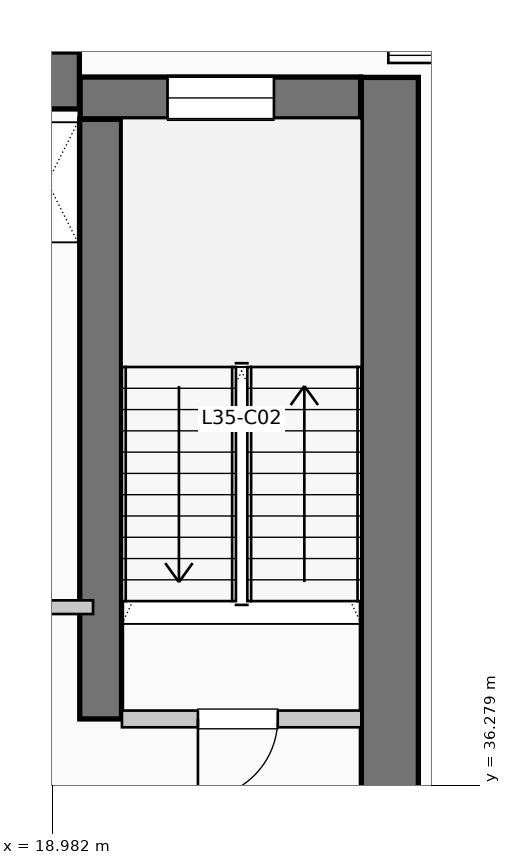
"""IFC4 building model, lengths in metres.
Left out: names, types, materials, properties, quantities, classifications, styles, units other than length and angle.
Written with IfcOpenShell. Run it as: python <this file> out.ifc"""

import sys

from ifc_helpers import new_model, si_unit, direction, frame, frame_2d, origin, place, context, subcontext, project, spatial, rectangle, extrude, element, fill, save


model = new_model("IFC4")
c1 = context("Model", 3, precision=1e-05, world=origin(), true_north=direction((0.0, 1.0)))
c2 = subcontext(c1, "Body", "Model", "MODEL_VIEW")
j1 = project(units=[si_unit("LENGTHUNIT", "METRE"), si_unit("PLANEANGLEUNIT", "RADIAN")], contexts=[c1])
p1 = place(None, origin())
s1 = spatial("IfcSite", under=j1, at=p1, CompositionType="ELEMENT")
p2 = place(p1, origin())
s2 = spatial("IfcBuilding", under=s1, at=p2, CompositionType="ELEMENT")
p3 = place(p2, frame((0.0, 0.0, 146.85)))
s3 = spatial("IfcBuildingStorey", under=s2, at=p3, CompositionType="ELEMENT", Elevation=146.85)
p4 = place(p3, frame((5.36, 45.55, 0.0), z_axis=(0.0, 0.0, 1.0), x_axis=(1.0, 0.0, 0.0)))
e1 = element("IfcWall", 1, at=p4, inside=s3, PredefinedType="SHEAR", context=c2, shape_type="SweptSolid", body=[
    extrude(rectangle(XDim=13.98, YDim=0.75, at=frame_2d((6.99, 0.0))), origin(), (0.0, 0.0, 1.0), 3.96),
])
p5 = place(p3, frame((23.425, 34.95, 0.0), z_axis=(0.0, 0.0, 1.0), x_axis=(0.0, 1.0, 0.0)))
e2 = element("IfcWall", 2, at=p5, inside=s3, PredefinedType="SHEAR", context=c2, shape_type="SweptSolid", body=[
    extrude(rectangle(XDim=10.64, YDim=0.75, at=frame_2d((5.32, 0.0))), origin(), (0.0, 0.0, 1.0), 3.96),
])
p6 = place(p3, frame((19.62, 37.15, 0.0), z_axis=(0.0, 0.0, 1.0), x_axis=(0.0, 1.0, 0.0)))
e3 = element("IfcWall", 3, at=p6, inside=s3, PredefinedType="SHEAR", context=c2, shape_type="SweptSolid", body=[
    extrude(rectangle(XDim=7.89, YDim=0.55, at=frame_2d((3.945, 0.0))), origin(), (0.0, 0.0, 1.0), 3.96),
])
p7 = place(p3, frame((19.35, 45.32, 0.0), z_axis=(0.0, 0.0, 1.0), x_axis=(1.0, 0.0, 0.0)))
e4 = element("IfcWall", 4, at=p7, inside=s3, PredefinedType="SHEAR", context=c2, shape_type="SweptSolid", body=[
    extrude(rectangle(XDim=3.69, YDim=0.55, at=frame_2d((1.845, 0.0))), origin(), (0.0, 0.0, 1.0), 3.96),
])
p8 = place(p7, frame((1.15, 0.0, 1.05)))
e5 = element("IfcOpeningElement", 5, at=p8, cuts=e4, PredefinedType="OPENING", context=c2, shape_type="SweptSolid", body=[
    extrude(rectangle(XDim=1.4, YDim=1.8, at=frame_2d((0.7, 0.9))), frame((0.0, 0.285, 0.0), z_axis=(0.0, -1.0, 0.0), x_axis=(1.0, 0.0, 0.0)), (0.0, 0.0, 1.0), 0.57),
])
p9 = place(p3, frame((19.9, 37.15, 0.0), z_axis=(0.0, 0.0, 1.0), x_axis=(1.0, 0.0, 0.0)))
e6 = element("IfcWall", 6, at=p9, inside=s3, PredefinedType="PARTITIONING", context=c2, shape_type="SweptSolid", body=[
    extrude(rectangle(XDim=3.15, YDim=0.22, at=frame_2d((1.575, 0.0))), origin(), (0.0, 0.0, 1.0), 3.71),
])
p10 = place(p9, frame((2.05, 0.0, 0.0), z_axis=(0.0, 0.0, 1.0), x_axis=(-1.0, 0.0, 0.0)))
e7 = element("IfcOpeningElement", 7, at=p10, cuts=e6, PredefinedType="OPENING", context=c2, shape_type="SweptSolid", body=[
    extrude(rectangle(XDim=1.05, YDim=2.15, at=frame_2d((0.525, 1.075))), frame((0.0, 0.12, 0.0), z_axis=(0.0, -1.0, 0.0), x_axis=(1.0, 0.0, 0.0)), (0.0, 0.0, 1.0), 0.24),
])
p11 = place(p3, frame((17.68, 38.62, 0.0), z_axis=(0.0, 0.0, 1.0), x_axis=(1.0, 0.0, 0.0)))
e8 = element("IfcWall", 8, at=p11, inside=s3, PredefinedType="PARTITIONING", context=c2, shape_type="SweptSolid", body=[
    extrude(rectangle(XDim=1.84, YDim=0.18, at=frame_2d((0.92, 0.0))), origin(), (0.0, 0.0, 1.0), 3.71),
])
p12 = place(p11, frame((0.24, 0.0, 0.0)))
e9 = element("IfcOpeningElement", 9, at=p12, cuts=e8, PredefinedType="OPENING", context=c2, shape_type="SweptSolid", body=[
    extrude(rectangle(XDim=0.92, YDim=2.1, at=frame_2d((0.46, 1.05))), frame((0.0, 0.1, 0.0), z_axis=(0.0, -1.0, 0.0), x_axis=(1.0, 0.0, 0.0)), (0.0, 0.0, 1.0), 0.2),
])
p13 = place(p8, origin())
e10 = element("IfcWindow", 10, at=p13, inside=s3, PartitioningType="SINGLE_PANEL", PredefinedType="WINDOW", context=c2, shape_type="SweptSolid", body=[
    extrude(rectangle(XDim=1.4, YDim=1.8, at=frame_2d((0.7, 0.9))), frame((0.0, 0.03, 0.0), z_axis=(0.0, -1.0, 0.0), x_axis=(1.0, 0.0, 0.0)), (0.0, 0.0, 1.0), 0.06),
])
fill(e5, e10)
p14 = place(p10, origin())
e11 = element("IfcDoor", 11, at=p14, inside=s3, OperationType="SINGLE_SWING_LEFT", PredefinedType="DOOR", context=c2, shape_type="SweptSolid", body=[
    extrude(rectangle(XDim=1.05, YDim=2.15, at=frame_2d((0.525, 1.075))), frame((0.0, 0.025, 0.0), z_axis=(0.0, -1.0, 0.0), x_axis=(1.0, 0.0, 0.0)), (0.0, 0.0, 1.0), 0.05),
])
fill(e7, e11)
save(model, sys.argv[1])
